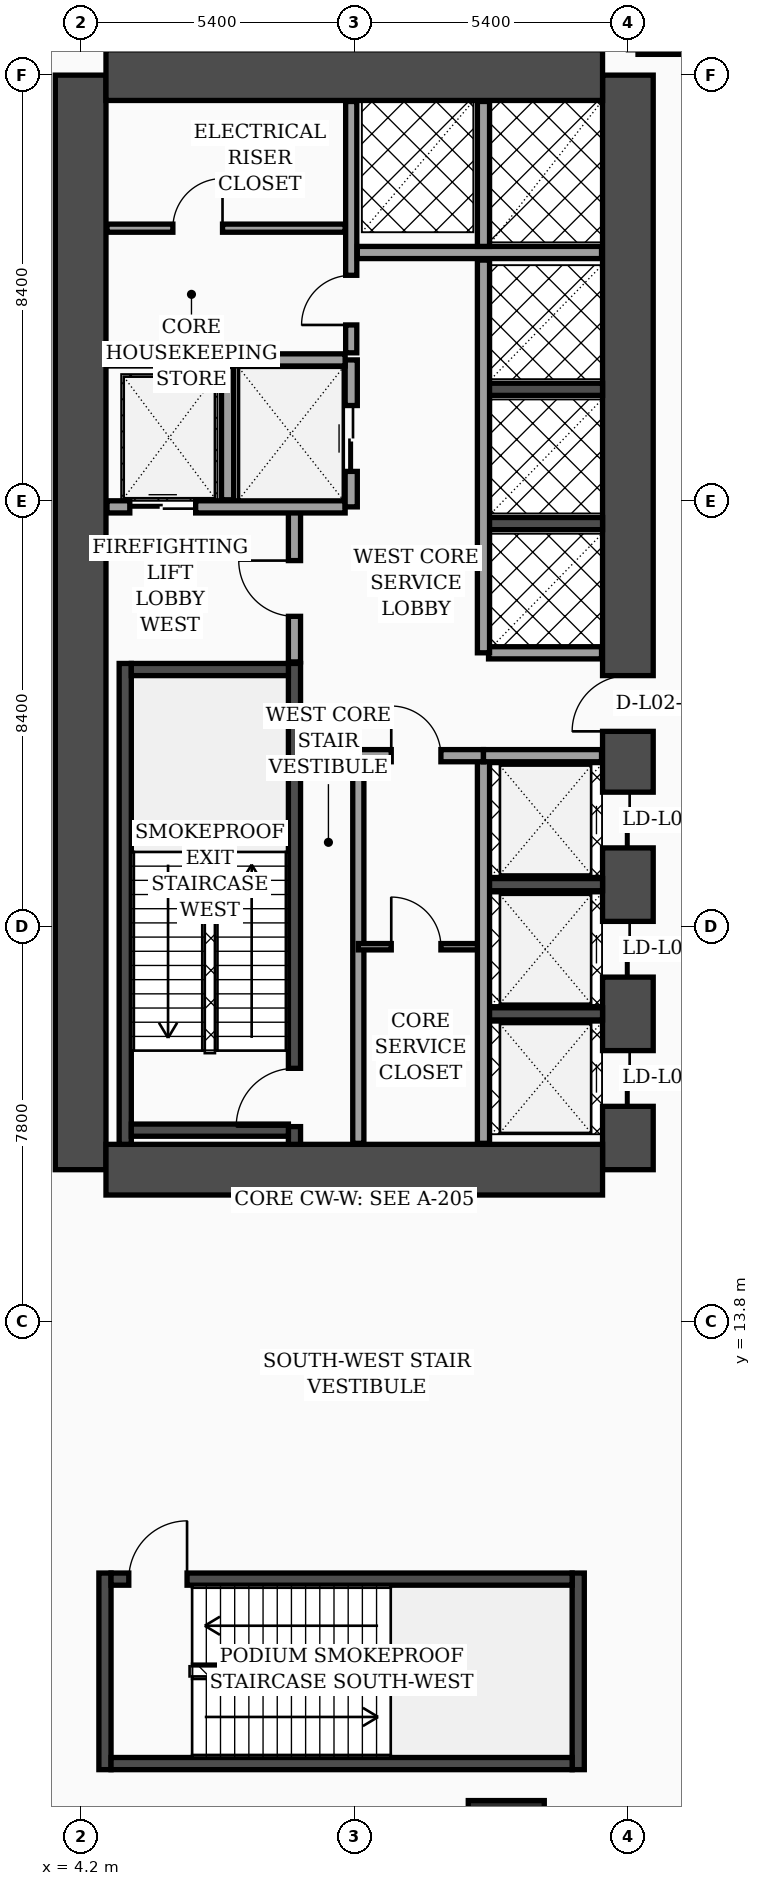
"""IFC4 building model, lengths in metres.
Left out: names, types, materials, properties, quantities, classifications, styles, units other than length and angle.
Written with IfcOpenShell. Run it as: python <this file> out.ifc"""

import sys

from ifc_helpers import new_model, si_unit, direction, frame, frame_2d, origin, origin_2d, place, context, subcontext, project, spatial, rectangle, extrude, element, fill, save


model = new_model("IFC4")
c1 = context("Model", 3, precision=1e-05, world=origin(), true_north=direction((0.0, 1.0)))
c2 = subcontext(c1, "Body", "Model", "MODEL_VIEW")
j1 = project(units=[si_unit("LENGTHUNIT", "METRE"), si_unit("PLANEANGLEUNIT", "RADIAN")], contexts=[c1])
p1 = place(None, origin())
s1 = spatial("IfcSite", under=j1, at=p1, CompositionType="ELEMENT")
p2 = place(p1, origin())
s2 = spatial("IfcBuilding", under=s1, at=p2, CompositionType="ELEMENT")
p3 = place(p2, frame((0.0, 0.0, 12.0)))
s3 = spatial("IfcBuildingStorey", under=s2, at=p3, CompositionType="ELEMENT", Elevation=12.0)
p4 = place(p3, frame((4.2, 16.8, 0.0), z_axis=(0.0, 0.0, 1.0), x_axis=(0.0, 1.0, 0.0)))
e1 = element("IfcWall", 1, at=p4, inside=s3, PredefinedType="SHEAR", context=c2, shape_type="SweptSolid", body=[
    extrude(rectangle(XDim=21.6, YDim=1.0, at=frame_2d((10.8, 0.0))), origin(), (0.0, 0.0, 1.0), 4.68),
])
p5 = place(p3, frame((15.0, 16.8, 0.0), z_axis=(0.0, 0.0, 1.0), x_axis=(0.0, 1.0, 0.0)))
e2 = element("IfcWall", 2, at=p5, inside=s3, PredefinedType="SHEAR", context=c2, shape_type="SweptSolid", body=[
    extrude(rectangle(XDim=21.6, YDim=1.0, at=frame_2d((10.8, 0.0))), origin(), (0.0, 0.0, 1.0), 4.68),
])
p6 = place(p5, frame((8.65, 0.0, 0.0)))
e3 = element("IfcOpeningElement", 3, at=p6, cuts=e2, PredefinedType="OPENING", context=c2, shape_type="SweptSolid", body=[
    extrude(rectangle(XDim=1.1, YDim=2.2, at=frame_2d((0.55, 1.1))), frame((0.0, 0.51, 0.0), z_axis=(0.0, -1.0, 0.0), x_axis=(1.0, 0.0, 0.0)), (0.0, 0.0, 1.0), 1.02),
])
p7 = place(p5, frame((1.25, 0.0, 0.0)))
e4 = element("IfcOpeningElement", 4, at=p7, cuts=e2, PredefinedType="OPENING", context=c2, shape_type="SweptSolid", body=[
    extrude(rectangle(XDim=1.1, YDim=2.2, at=frame_2d((0.55, 1.1))), frame((0.0, 0.51, 0.0), z_axis=(0.0, -1.0, 0.0), x_axis=(1.0, 0.0, 0.0)), (0.0, 0.0, 1.0), 1.02),
])
p8 = place(p5, frame((3.8, 0.0, 0.0)))
e5 = element("IfcOpeningElement", 5, at=p8, cuts=e2, PredefinedType="OPENING", context=c2, shape_type="SweptSolid", body=[
    extrude(rectangle(XDim=1.1, YDim=2.2, at=frame_2d((0.55, 1.1))), frame((0.0, 0.51, 0.0), z_axis=(0.0, -1.0, 0.0), x_axis=(1.0, 0.0, 0.0)), (0.0, 0.0, 1.0), 1.02),
])
p9 = place(p5, frame((6.35, 0.0, 0.0)))
e6 = element("IfcOpeningElement", 6, at=p9, cuts=e2, PredefinedType="OPENING", context=c2, shape_type="SweptSolid", body=[
    extrude(rectangle(XDim=1.1, YDim=2.2, at=frame_2d((0.55, 1.1))), frame((0.0, 0.51, 0.0), z_axis=(0.0, -1.0, 0.0), x_axis=(1.0, 0.0, 0.0)), (0.0, 0.0, 1.0), 1.02),
])
for number, where, z_axis, x_axis in (
    (7, (4.7, 38.4, 0.0), (0.0, 0.0, 1.0), (1.0, 0.0, 0.0)),
    (8, (4.7, 16.8, 0.0), (0.0, 0.0, 1.0), (1.0, 0.0, 0.0)),
):
    element("IfcWall", number, at=place(p3, frame(where, z_axis=z_axis, x_axis=x_axis)), inside=s3, PredefinedType="SHEAR", context=c2, shape_type="SweptSolid", body=[
        extrude(rectangle(XDim=9.8, YDim=1.0, at=frame_2d((4.9, 0.0))), origin(), (0.0, 0.0, 1.0), 4.68),
    ])
p10 = place(p3, frame((5.08, 17.3, 0.0), z_axis=(0.0, 0.0, 1.0), x_axis=(0.0, 1.0, 0.0)))
e9 = element("IfcWall", 9, at=p10, inside=s3, PredefinedType="SOLIDWALL", context=c2, shape_type="SweptSolid", body=[
    extrude(rectangle(XDim=9.49, YDim=0.24, at=frame_2d((4.745, 0.0))), origin(), (0.0, 0.0, 1.0), 4.68),
])
p11 = place(p3, frame((8.42, 17.3, 0.0), z_axis=(0.0, 0.0, 1.0), x_axis=(0.0, 1.0, 0.0)))
e10 = element("IfcWall", 10, at=p11, inside=s3, PredefinedType="SOLIDWALL", context=c2, shape_type="SweptSolid", body=[
    extrude(rectangle(XDim=9.49, YDim=0.24, at=frame_2d((4.745, 0.0))), origin(), (0.0, 0.0, 1.0), 4.68),
])
p12 = place(p11, frame((0.35, 0.0, 0.0)))
e11 = element("IfcOpeningElement", 11, at=p12, cuts=e10, PredefinedType="OPENING", context=c2, shape_type="SweptSolid", body=[
    extrude(rectangle(XDim=1.15, YDim=2.2, at=frame_2d((0.575, 1.1))), frame((0.0, 0.13, 0.0), z_axis=(0.0, -1.0, 0.0), x_axis=(1.0, 0.0, 0.0)), (0.0, 0.0, 1.0), 0.26),
])
for number, where, z_axis, x_axis in (
    (12, (5.2, 17.58, 0.0), (0.0, 0.0, 1.0), (1.0, 0.0, 0.0)),
    (13, (5.2, 26.67, 0.0), (0.0, 0.0, 1.0), (1.0, 0.0, 0.0)),
):
    element("IfcWall", number, at=place(p3, frame(where, z_axis=z_axis, x_axis=x_axis)), inside=s3, PredefinedType="SOLIDWALL", context=c2, shape_type="SweptSolid", body=[
        extrude(rectangle(XDim=3.1, YDim=0.24, at=frame_2d((1.55, 0.0))), origin(), (0.0, 0.0, 1.0), 4.68),
    ])
for number, where, z_axis, x_axis in (
    (14, (4.68, 4.96, 0.0), (0.0, 0.0, 1.0), (0.0, 1.0, 0.0)),
    (15, (14.02, 4.96, 0.0), (0.0, 0.0, 1.0), (0.0, 1.0, 0.0)),
):
    element("IfcWall", number, at=place(p3, frame(where, z_axis=z_axis, x_axis=x_axis)), inside=s3, PredefinedType="SOLIDWALL", context=c2, shape_type="SweptSolid", body=[
        extrude(rectangle(XDim=3.88, YDim=0.24, at=frame_2d((1.94, 0.0))), origin(), (0.0, 0.0, 1.0), 4.68),
    ])
p13 = place(p3, frame((4.8, 5.08, 0.0), z_axis=(0.0, 0.0, 1.0), x_axis=(1.0, 0.0, 0.0)))
e16 = element("IfcWall", 16, at=p13, inside=s3, PredefinedType="SOLIDWALL", context=c2, shape_type="SweptSolid", body=[
    extrude(rectangle(XDim=9.1, YDim=0.24, at=frame_2d((4.55, 0.0))), origin(), (0.0, 0.0, 1.0), 4.68),
])
p14 = place(p3, frame((4.8, 8.72, 0.0), z_axis=(0.0, 0.0, 1.0), x_axis=(1.0, 0.0, 0.0)))
e17 = element("IfcWall", 17, at=p14, inside=s3, PredefinedType="SOLIDWALL", context=c2, shape_type="SweptSolid", body=[
    extrude(rectangle(XDim=9.1, YDim=0.24, at=frame_2d((4.55, 0.0))), origin(), (0.0, 0.0, 1.0), 4.68),
])
p15 = place(p14, frame((0.35, 0.0, 0.0)))
e18 = element("IfcOpeningElement", 18, at=p15, cuts=e17, PredefinedType="OPENING", context=c2, shape_type="SweptSolid", body=[
    extrude(rectangle(XDim=1.15, YDim=2.2, at=frame_2d((0.575, 1.1))), frame((0.0, 0.13, 0.0), z_axis=(0.0, -1.0, 0.0), x_axis=(1.0, 0.0, 0.0)), (0.0, 0.0, 1.0), 0.26),
])
for number, where, z_axis, x_axis in (
    (19, (12.18, 19.875, 0.0), (0.0, 0.0, 1.0), (1.0, 0.0, 0.0)),
    (20, (12.18, 22.425, 0.0), (0.0, 0.0, 1.0), (1.0, 0.0, 0.0)),
    (21, (12.18, 29.55, 0.0), (0.0, 0.0, 1.0), (1.0, 0.0, 0.0)),
    (22, (12.18, 32.2, 0.0), (0.0, 0.0, 1.0), (1.0, 0.0, 0.0)),
):
    element("IfcWall", number, at=place(p3, frame(where, z_axis=z_axis, x_axis=x_axis)), inside=s3, PredefinedType="SOLIDWALL", context=c2, shape_type="SweptSolid", body=[
        extrude(rectangle(XDim=2.32, YDim=0.24, at=frame_2d((1.16, 0.0))), origin(), (0.0, 0.0, 1.0), 4.68),
    ])
p16 = place(p3, frame((12.6, 3.6, 0.0), z_axis=(0.0, 0.0, 1.0), x_axis=(1.0, 0.0, 0.0)))
e23 = element("IfcColumn", 23, at=p16, inside=s3, PredefinedType="COLUMN", context=c2, shape_type="SweptSolid", body=[
    extrude(rectangle(XDim=1.5, YDim=1.5, at=origin_2d()), origin(), (0.0, 0.0, 1.0), 4.68),
])
p17 = place(p3, frame((8.42, 26.82, 0.0), z_axis=(0.0, 0.0, 1.0), x_axis=(0.0, 1.0, 0.0)))
e24 = element("IfcWall", 24, at=p17, inside=s3, PredefinedType="SOLIDWALL", context=c2, shape_type="SweptSolid", body=[
    extrude(rectangle(XDim=3.0, YDim=0.24, at=frame_2d((1.5, 0.0))), origin(), (0.0, 0.0, 1.0), 4.68),
])
p18 = place(p17, frame((0.9, 0.0, 0.0)))
e25 = element("IfcOpeningElement", 25, at=p18, cuts=e24, PredefinedType="OPENING", context=c2, shape_type="SweptSolid", body=[
    extrude(rectangle(XDim=1.1, YDim=2.2, at=frame_2d((0.55, 1.1))), frame((0.0, 0.13, 0.0), z_axis=(0.0, -1.0, 0.0), x_axis=(1.0, 0.0, 0.0)), (0.0, 0.0, 1.0), 0.26),
])
p19 = place(p3, frame((4.72, 29.88, 0.0), z_axis=(0.0, 0.0, 1.0), x_axis=(1.0, 0.0, 0.0)))
e26 = element("IfcWall", 26, at=p19, inside=s3, PredefinedType="SOLIDWALL", context=c2, shape_type="SweptSolid", body=[
    extrude(rectangle(XDim=4.7, YDim=0.24, at=frame_2d((2.35, 0.0))), origin(), (0.0, 0.0, 1.0), 4.68),
])
p20 = place(p19, frame((0.45, 0.0, 0.0)))
e27 = element("IfcOpeningElement", 27, at=p20, cuts=e26, PredefinedType="OPENING", context=c2, shape_type="SweptSolid", body=[
    extrude(rectangle(XDim=1.3, YDim=2.35, at=frame_2d((0.65, 1.175))), frame((0.0, 0.13, 0.0), z_axis=(0.0, -1.0, 0.0), x_axis=(1.0, 0.0, 0.0)), (0.0, 0.0, 1.0), 0.26),
])
p21 = place(p3, frame((7.1, 30.02, 0.0), z_axis=(0.0, 0.0, 1.0), x_axis=(0.0, 1.0, 0.0)))
e28 = element("IfcWall", 28, at=p21, inside=s3, PredefinedType="SOLIDWALL", context=c2, shape_type="SweptSolid", body=[
    extrude(rectangle(XDim=2.63, YDim=0.24, at=frame_2d((1.315, 0.0))), origin(), (0.0, 0.0, 1.0), 4.68),
])
p22 = place(p3, frame((9.54, 29.88, 0.0), z_axis=(0.0, 0.0, 1.0), x_axis=(0.0, 1.0, 0.0)))
e29 = element("IfcWall", 29, at=p22, inside=s3, PredefinedType="SOLIDWALL", context=c2, shape_type="SweptSolid", body=[
    extrude(rectangle(XDim=2.9, YDim=0.24, at=frame_2d((1.45, 0.0))), origin(), (0.0, 0.0, 1.0), 4.68),
])
p23 = place(p22, frame((0.7, 0.0, 0.0)))
e30 = element("IfcOpeningElement", 30, at=p23, cuts=e29, PredefinedType="OPENING", context=c2, shape_type="SweptSolid", body=[
    extrude(rectangle(XDim=1.3, YDim=2.35, at=frame_2d((0.65, 1.175))), frame((0.0, 0.13, 0.0), z_axis=(0.0, -1.0, 0.0), x_axis=(1.0, 0.0, 0.0)), (0.0, 0.0, 1.0), 0.26),
])
p24 = place(p3, frame((4.72, 32.78, 0.0), z_axis=(0.0, 0.0, 1.0), x_axis=(1.0, 0.0, 0.0)))
e31 = element("IfcWall", 31, at=p24, inside=s3, PredefinedType="SOLIDWALL", context=c2, shape_type="SweptSolid", body=[
    extrude(rectangle(XDim=4.7, YDim=0.24, at=frame_2d((2.35, 0.0))), origin(), (0.0, 0.0, 1.0), 4.68),
])
p25 = place(p3, frame((9.68, 17.32, 0.0), z_axis=(0.0, 0.0, 1.0), x_axis=(0.0, 1.0, 0.0)))
e32 = element("IfcWall", 32, at=p25, inside=s3, PredefinedType="SOLIDWALL", context=c2, shape_type="SweptSolid", body=[
    extrude(rectangle(XDim=7.68, YDim=0.22, at=frame_2d((3.84, 0.0))), origin(), (0.0, 0.0, 1.0), 4.68),
])
p26 = place(p3, frame((4.72, 35.38, 0.0), z_axis=(0.0, 0.0, 1.0), x_axis=(1.0, 0.0, 0.0)))
e33 = element("IfcWall", 33, at=p26, inside=s3, PredefinedType="PARTITIONING", context=c2, shape_type="SweptSolid", body=[
    extrude(rectangle(XDim=4.7, YDim=0.16, at=frame_2d((2.35, 0.0))), origin(), (0.0, 0.0, 1.0), 4.68),
])
p27 = place(p26, frame((1.3, 0.0, 0.0)))
e34 = element("IfcOpeningElement", 34, at=p27, cuts=e33, PredefinedType="OPENING", context=c2, shape_type="SweptSolid", body=[
    extrude(rectangle(XDim=0.98, YDim=2.15, at=frame_2d((0.49, 1.075))), frame((0.0, 0.09, 0.0), z_axis=(0.0, -1.0, 0.0), x_axis=(1.0, 0.0, 0.0)), (0.0, 0.0, 1.0), 0.18),
])
p28 = place(p3, frame((9.54, 32.92, 0.0), z_axis=(0.0, 0.0, 1.0), x_axis=(0.0, 1.0, 0.0)))
e35 = element("IfcWall", 35, at=p28, inside=s3, PredefinedType="SOLIDWALL", context=c2, shape_type="SweptSolid", body=[
    extrude(rectangle(XDim=4.96, YDim=0.22, at=frame_2d((2.48, 0.0))), origin(), (0.0, 0.0, 1.0), 4.68),
])
p29 = place(p28, frame((0.55, 0.0, 0.0)))
e36 = element("IfcOpeningElement", 36, at=p29, cuts=e35, PredefinedType="OPENING", context=c2, shape_type="SweptSolid", body=[
    extrude(rectangle(XDim=0.98, YDim=2.15, at=frame_2d((0.49, 1.075))), frame((0.0, 0.12, 0.0), z_axis=(0.0, -1.0, 0.0), x_axis=(1.0, 0.0, 0.0)), (0.0, 0.0, 1.0), 0.24),
])
p30 = place(p3, frame((9.68, 21.2, 0.0), z_axis=(0.0, 0.0, 1.0), x_axis=(1.0, 0.0, 0.0)))
e37 = element("IfcWall", 37, at=p30, inside=s3, PredefinedType="PARTITIONING", context=c2, shape_type="SweptSolid", body=[
    extrude(rectangle(XDim=2.47, YDim=0.125, at=frame_2d((1.235, 0.0))), origin(), (0.0, 0.0, 1.0), 4.68),
])
p31 = place(p30, frame((0.65, 0.0, 0.0)))
e38 = element("IfcOpeningElement", 38, at=p31, cuts=e37, PredefinedType="OPENING", context=c2, shape_type="SweptSolid", body=[
    extrude(rectangle(XDim=0.98, YDim=2.15, at=frame_2d((0.49, 1.075))), frame((0.0, 0.073, 0.0), z_axis=(0.0, -1.0, 0.0), x_axis=(1.0, 0.0, 0.0)), (0.0, 0.0, 1.0), 0.145),
])
p32 = place(p3, frame((12.15, 17.32, 0.0), z_axis=(0.0, 0.0, 1.0), x_axis=(0.0, 1.0, 0.0)))
e39 = element("IfcWall", 39, at=p32, inside=s3, PredefinedType="SOLIDWALL", context=c2, shape_type="SweptSolid", body=[
    extrude(rectangle(XDim=7.65, YDim=0.24, at=frame_2d((3.825, 0.0))), origin(), (0.0, 0.0, 1.0), 4.68),
])
p33 = place(p3, frame((9.68, 24.97, 0.0), z_axis=(0.0, 0.0, 1.0), x_axis=(1.0, 0.0, 0.0)))
e40 = element("IfcWall", 40, at=p33, inside=s3, PredefinedType="SOLIDWALL", context=c2, shape_type="SweptSolid", body=[
    extrude(rectangle(XDim=2.47, YDim=0.24, at=frame_2d((1.235, 0.0))), origin(), (0.0, 0.0, 1.0), 4.68),
])
p34 = place(p33, frame((0.65, 0.0, 0.0)))
e41 = element("IfcOpeningElement", 41, at=p34, cuts=e40, PredefinedType="OPENING", context=c2, shape_type="SweptSolid", body=[
    extrude(rectangle(XDim=0.98, YDim=2.15, at=frame_2d((0.49, 1.075))), frame((0.0, 0.13, 0.0), z_axis=(0.0, -1.0, 0.0), x_axis=(1.0, 0.0, 0.0)), (0.0, 0.0, 1.0), 0.26),
])
p35 = place(p3, frame((12.15, 24.97, 0.0), z_axis=(0.0, 0.0, 1.0), x_axis=(1.0, 0.0, 0.0)))
e42 = element("IfcWall", 42, at=p35, inside=s3, PredefinedType="SOLIDWALL", context=c2, shape_type="SweptSolid", body=[
    extrude(rectangle(XDim=2.33, YDim=0.24, at=frame_2d((1.165, 0.0))), origin(), (0.0, 0.0, 1.0), 3.88),
])
p36 = place(p3, frame((12.25, 27.0, 0.0), z_axis=(0.0, 0.0, 1.0), x_axis=(1.0, 0.0, 0.0)))
e43 = element("IfcWall", 43, at=p36, inside=s3, PredefinedType="SOLIDWALL", context=c2, shape_type="SweptSolid", body=[
    extrude(rectangle(XDim=2.23, YDim=0.24, at=frame_2d((1.115, 0.0))), origin(), (0.0, 0.0, 1.0), 4.68),
])
p37 = place(p3, frame((12.15, 27.0, 0.0), z_axis=(0.0, 0.0, 1.0), x_axis=(0.0, 1.0, 0.0)))
e44 = element("IfcWall", 44, at=p37, inside=s3, PredefinedType="SOLIDWALL", context=c2, shape_type="SweptSolid", body=[
    extrude(rectangle(XDim=7.75, YDim=0.24, at=frame_2d((3.875, 0.0))), origin(), (0.0, 0.0, 1.0), 4.68),
])
p38 = place(p3, frame((9.66, 34.9, 0.0), z_axis=(0.0, 0.0, 1.0), x_axis=(1.0, 0.0, 0.0)))
e45 = element("IfcWall", 45, at=p38, inside=s3, PredefinedType="SOLIDWALL", context=c2, shape_type="SweptSolid", body=[
    extrude(rectangle(XDim=4.82, YDim=0.24, at=frame_2d((2.41, 0.0))), origin(), (0.0, 0.0, 1.0), 4.68),
])
p39 = place(p3, frame((12.15, 35.02, 0.0), z_axis=(0.0, 0.0, 1.0), x_axis=(0.0, 1.0, 0.0)))
e46 = element("IfcWall", 46, at=p39, inside=s3, PredefinedType="SOLIDWALL", context=c2, shape_type="SweptSolid", body=[
    extrude(rectangle(XDim=2.86, YDim=0.24, at=frame_2d((1.43, 0.0))), origin(), (0.0, 0.0, 1.0), 4.68),
])
p40 = place(p3, frame((15.2, 38.9, 0.0), z_axis=(0.0, 0.0, 1.0), x_axis=(1.0, 0.0, 0.0)))
e47 = element("IfcWall", 47, at=p40, inside=s3, PredefinedType="PARTITIONING", context=c2, shape_type="SweptSolid", body=[
    extrude(rectangle(XDim=18.1, YDim=0.18, at=frame_2d((9.05, 0.0))), origin(), (0.0, 0.0, 1.0), 3.88),
])
p41 = place(p40, frame((2.2, 0.0, 0.0)))
e48 = element("IfcOpeningElement", 48, at=p41, cuts=e47, PredefinedType="OPENING", context=c2, shape_type="SweptSolid", body=[
    extrude(rectangle(XDim=1.02, YDim=2.2, at=frame_2d((0.51, 1.1))), frame((0.0, 0.1, 0.0), z_axis=(0.0, -1.0, 0.0), x_axis=(1.0, 0.0, 0.0)), (0.0, 0.0, 1.0), 0.2),
])
p42 = place(p40, frame((8.2, 0.0, 0.0)))
e49 = element("IfcOpeningElement", 49, at=p42, cuts=e47, PredefinedType="OPENING", context=c2, shape_type="SweptSolid", body=[
    extrude(rectangle(XDim=1.02, YDim=2.2, at=frame_2d((0.51, 1.1))), frame((0.0, 0.1, 0.0), z_axis=(0.0, -1.0, 0.0), x_axis=(1.0, 0.0, 0.0)), (0.0, 0.0, 1.0), 0.2),
])
p43 = place(p40, frame((14.2, 0.0, 0.0)))
e50 = element("IfcOpeningElement", 50, at=p43, cuts=e47, PredefinedType="OPENING", context=c2, shape_type="SweptSolid", body=[
    extrude(rectangle(XDim=1.02, YDim=2.2, at=frame_2d((0.51, 1.1))), frame((0.0, 0.1, 0.0), z_axis=(0.0, -1.0, 0.0), x_axis=(1.0, 0.0, 0.0)), (0.0, 0.0, 1.0), 0.2),
])
p44 = place(p18, origin())
e51 = element("IfcDoor", 51, at=p44, inside=s3, OperationType="SINGLE_SWING_RIGHT", PredefinedType="DOOR", context=c2, shape_type="SweptSolid", body=[
    extrude(rectangle(XDim=1.1, YDim=2.2, at=frame_2d((0.55, 1.1))), frame((0.0, 0.025, 0.0), z_axis=(0.0, -1.0, 0.0), x_axis=(1.0, 0.0, 0.0)), (0.0, 0.0, 1.0), 0.05),
])
fill(e25, e51)
p45 = place(p20, origin())
e52 = element("IfcDoor", 52, at=p45, inside=s3, OperationType="DOUBLE_DOOR_SLIDING", PredefinedType="DOOR", context=c2, shape_type="SweptSolid", body=[
    extrude(rectangle(XDim=1.3, YDim=2.35, at=frame_2d((0.65, 1.175))), frame((0.0, 0.025, 0.0), z_axis=(0.0, -1.0, 0.0), x_axis=(1.0, 0.0, 0.0)), (0.0, 0.0, 1.0), 0.05),
])
fill(e27, e52)
p46 = place(p23, origin())
e53 = element("IfcDoor", 53, at=p46, inside=s3, OperationType="DOUBLE_DOOR_SLIDING", PredefinedType="DOOR", context=c2, shape_type="SweptSolid", body=[
    extrude(rectangle(XDim=1.3, YDim=2.35, at=frame_2d((0.65, 1.175))), frame((0.0, 0.025, 0.0), z_axis=(0.0, -1.0, 0.0), x_axis=(1.0, 0.0, 0.0)), (0.0, 0.0, 1.0), 0.05),
])
fill(e30, e53)
p47 = place(p27, origin())
e54 = element("IfcDoor", 54, at=p47, inside=s3, OperationType="SINGLE_SWING_RIGHT", PredefinedType="DOOR", context=c2, shape_type="SweptSolid", body=[
    extrude(rectangle(XDim=0.98, YDim=2.15, at=frame_2d((0.49, 1.075))), frame((0.0, 0.025, 0.0), z_axis=(0.0, -1.0, 0.0), x_axis=(1.0, 0.0, 0.0)), (0.0, 0.0, 1.0), 0.05),
])
fill(e34, e54)
p48 = place(p29, origin())
e55 = element("IfcDoor", 55, at=p48, inside=s3, OperationType="SINGLE_SWING_LEFT", PredefinedType="DOOR", context=c2, shape_type="SweptSolid", body=[
    extrude(rectangle(XDim=0.98, YDim=2.15, at=frame_2d((0.49, 1.075))), frame((0.0, 0.025, 0.0), z_axis=(0.0, -1.0, 0.0), x_axis=(1.0, 0.0, 0.0)), (0.0, 0.0, 1.0), 0.05),
])
fill(e36, e55)
p49 = place(p31, origin())
e56 = element("IfcDoor", 56, at=p49, inside=s3, OperationType="SINGLE_SWING_LEFT", PredefinedType="DOOR", context=c2, shape_type="SweptSolid", body=[
    extrude(rectangle(XDim=0.98, YDim=2.15, at=frame_2d((0.49, 1.075))), frame((0.0, 0.025, 0.0), z_axis=(0.0, -1.0, 0.0), x_axis=(1.0, 0.0, 0.0)), (0.0, 0.0, 1.0), 0.05),
])
fill(e38, e56)
p50 = place(p34, origin())
e57 = element("IfcDoor", 57, at=p50, inside=s3, OperationType="SINGLE_SWING_LEFT", PredefinedType="DOOR", context=c2, shape_type="SweptSolid", body=[
    extrude(rectangle(XDim=0.98, YDim=2.15, at=frame_2d((0.49, 1.075))), frame((0.0, 0.025, 0.0), z_axis=(0.0, -1.0, 0.0), x_axis=(1.0, 0.0, 0.0)), (0.0, 0.0, 1.0), 0.05),
])
fill(e41, e57)
p51 = place(p12, origin())
e58 = element("IfcDoor", 58, at=p51, inside=s3, OperationType="SINGLE_SWING_LEFT", PredefinedType="DOOR", context=c2, shape_type="SweptSolid", body=[
    extrude(rectangle(XDim=1.15, YDim=2.2, at=frame_2d((0.575, 1.1))), frame((0.0, 0.025, 0.0), z_axis=(0.0, -1.0, 0.0), x_axis=(1.0, 0.0, 0.0)), (0.0, 0.0, 1.0), 0.05),
])
fill(e11, e58)
p52 = place(p15, origin())
e59 = element("IfcDoor", 59, at=p52, inside=s3, OperationType="SINGLE_SWING_RIGHT", PredefinedType="DOOR", context=c2, shape_type="SweptSolid", body=[
    extrude(rectangle(XDim=1.15, YDim=2.2, at=frame_2d((0.575, 1.1))), frame((0.0, 0.025, 0.0), z_axis=(0.0, -1.0, 0.0), x_axis=(1.0, 0.0, 0.0)), (0.0, 0.0, 1.0), 0.05),
])
fill(e18, e59)
p53 = place(p6, origin())
e60 = element("IfcDoor", 60, at=p53, inside=s3, OperationType="SINGLE_SWING_LEFT", PredefinedType="DOOR", context=c2, shape_type="SweptSolid", body=[
    extrude(rectangle(XDim=1.1, YDim=2.2, at=frame_2d((0.55, 1.1))), frame((0.0, 0.025, 0.0), z_axis=(0.0, -1.0, 0.0), x_axis=(1.0, 0.0, 0.0)), (0.0, 0.0, 1.0), 0.05),
])
fill(e3, e60)
p54 = place(p7, origin())
e61 = element("IfcDoor", 61, at=p54, inside=s3, OperationType="DOUBLE_DOOR_SLIDING", PredefinedType="DOOR", context=c2, shape_type="SweptSolid", body=[
    extrude(rectangle(XDim=1.1, YDim=2.2, at=frame_2d((0.55, 1.1))), frame((0.0, 0.025, 0.0), z_axis=(0.0, -1.0, 0.0), x_axis=(1.0, 0.0, 0.0)), (0.0, 0.0, 1.0), 0.05),
])
fill(e4, e61)
p55 = place(p8, origin())
e62 = element("IfcDoor", 62, at=p55, inside=s3, OperationType="DOUBLE_DOOR_SLIDING", PredefinedType="DOOR", context=c2, shape_type="SweptSolid", body=[
    extrude(rectangle(XDim=1.1, YDim=2.2, at=frame_2d((0.55, 1.1))), frame((0.0, 0.025, 0.0), z_axis=(0.0, -1.0, 0.0), x_axis=(1.0, 0.0, 0.0)), (0.0, 0.0, 1.0), 0.05),
])
fill(e5, e62)
p56 = place(p9, origin())
e63 = element("IfcDoor", 63, at=p56, inside=s3, OperationType="DOUBLE_DOOR_SLIDING", PredefinedType="DOOR", context=c2, shape_type="SweptSolid", body=[
    extrude(rectangle(XDim=1.1, YDim=2.2, at=frame_2d((0.55, 1.1))), frame((0.0, 0.025, 0.0), z_axis=(0.0, -1.0, 0.0), x_axis=(1.0, 0.0, 0.0)), (0.0, 0.0, 1.0), 0.05),
])
fill(e6, e63)
save(model, sys.argv[1])
